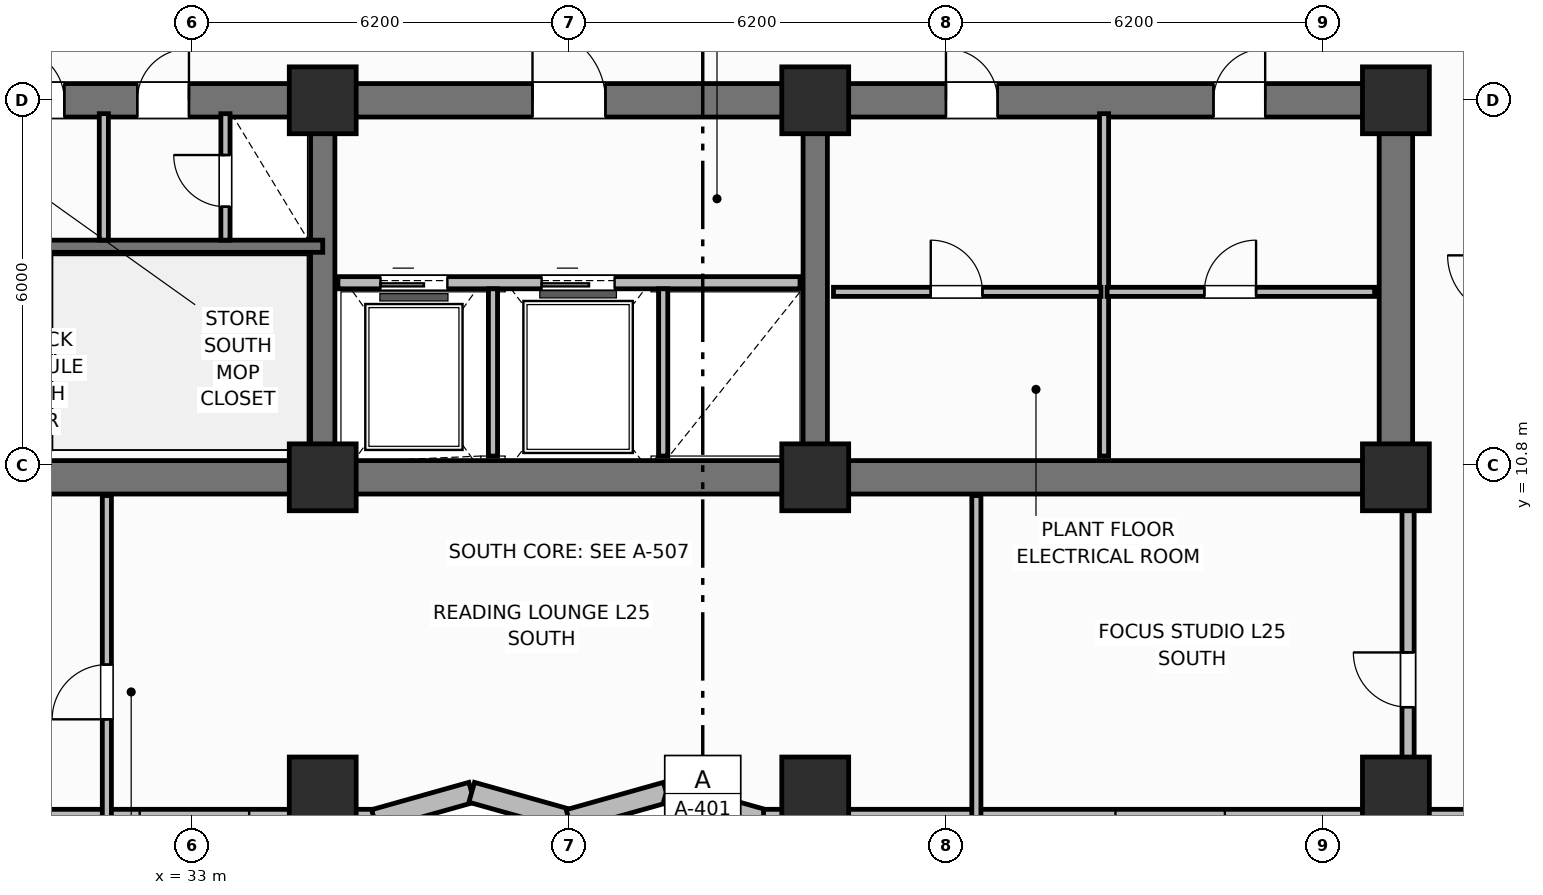
"""IFC4 building model, lengths in metres.
Left out: names, types, materials, properties, quantities, classifications, styles, units other than length and angle.
Written with IfcOpenShell. Run it as: python <this file> out.ifc"""

import sys

from ifc_helpers import new_model, si_unit, direction, frame, frame_2d, origin, origin_2d, place, context, subcontext, project, spatial, rectangle, extrude, element, fill, save


model = new_model("IFC4")
c1 = context("Model", 3, precision=1e-05, world=origin(), true_north=direction((0.0, 1.0)))
c2 = subcontext(c1, "Body", "Model", "MODEL_VIEW")
j1 = project(units=[si_unit("LENGTHUNIT", "METRE"), si_unit("PLANEANGLEUNIT", "RADIAN")], contexts=[c1])
p1 = place(None, origin())
s1 = spatial("IfcSite", under=j1, at=p1, CompositionType="ELEMENT")
p2 = place(p1, origin())
s2 = spatial("IfcBuilding", under=s1, at=p2, CompositionType="ELEMENT")
p3 = place(p2, frame((0.0, 0.0, 103.1)))
s3 = spatial("IfcBuildingStorey", under=s2, at=p3, CompositionType="ELEMENT", Elevation=103.1)
p4 = place(p3, frame((52.8, 10.6, 0.0), z_axis=(0.0, 0.0, 1.0), x_axis=(-1.0, 0.0, 0.0)))
e1 = element("IfcWall", 1, at=p4, inside=s3, PredefinedType="SHEAR", context=c2, shape_type="SweptSolid", body=[
    extrude(rectangle(XDim=27.2, YDim=0.55, at=frame_2d((13.6, 0.0))), origin(), (0.0, 0.0, 1.0), 3.7),
])
p5 = place(p3, frame((52.8, 10.875, 0.0), z_axis=(0.0, 0.0, 1.0), x_axis=(0.0, 1.0, 0.0)))
e2 = element("IfcWall", 2, at=p5, inside=s3, PredefinedType="SHEAR", context=c2, shape_type="SweptSolid", body=[
    extrude(rectangle(XDim=5.65, YDim=0.55, at=frame_2d((2.825, 0.0))), origin(), (0.0, 0.0, 1.0), 3.7),
])
p6 = place(p3, frame((25.6, 16.8, 0.0), z_axis=(0.0, 0.0, 1.0), x_axis=(1.0, 0.0, 0.0)))
e3 = element("IfcWall", 3, at=p6, inside=s3, PredefinedType="SHEAR", context=c2, shape_type="SweptSolid", body=[
    extrude(rectangle(XDim=27.2, YDim=0.55, at=frame_2d((13.6, 0.0))), origin(), (0.0, 0.0, 1.0), 3.7),
])
p7 = place(p6, frame((1.7, 0.0, 0.0)))
e4 = element("IfcOpeningElement", 4, at=p7, cuts=e3, PredefinedType="OPENING", context=c2, shape_type="SweptSolid", body=[
    extrude(rectangle(XDim=1.1, YDim=2.15, at=frame_2d((0.55, 1.075))), frame((0.0, 0.285, 0.0), z_axis=(0.0, -1.0, 0.0), x_axis=(1.0, 0.0, 0.0)), (0.0, 0.0, 1.0), 0.57),
])
p8 = place(p6, frame((4.45, 0.0, 0.0)))
e5 = element("IfcOpeningElement", 5, at=p8, cuts=e3, PredefinedType="OPENING", context=c2, shape_type="SweptSolid", body=[
    extrude(rectangle(XDim=0.85, YDim=2.1, at=frame_2d((0.425, 1.05))), frame((0.0, 0.285, 0.0), z_axis=(0.0, -1.0, 0.0), x_axis=(1.0, 0.0, 0.0)), (0.0, 0.0, 1.0), 0.57),
])
p9 = place(p6, frame((6.5, 0.0, 0.0)))
e6 = element("IfcOpeningElement", 6, at=p9, cuts=e3, PredefinedType="OPENING", context=c2, shape_type="SweptSolid", body=[
    extrude(rectangle(XDim=0.85, YDim=2.1, at=frame_2d((0.425, 1.05))), frame((0.0, 0.285, 0.0), z_axis=(0.0, -1.0, 0.0), x_axis=(1.0, 0.0, 0.0)), (0.0, 0.0, 1.0), 0.57),
])
p10 = place(p6, frame((13.0, 0.0, 0.0)))
e7 = element("IfcOpeningElement", 7, at=p10, cuts=e3, PredefinedType="OPENING", context=c2, shape_type="SweptSolid", body=[
    extrude(rectangle(XDim=1.2, YDim=2.15, at=frame_2d((0.6, 1.075))), frame((0.0, 0.285, 0.0), z_axis=(0.0, -1.0, 0.0), x_axis=(1.0, 0.0, 0.0)), (0.0, 0.0, 1.0), 0.57),
])
p11 = place(p6, frame((19.8, 0.0, 0.0)))
e8 = element("IfcOpeningElement", 8, at=p11, cuts=e3, PredefinedType="OPENING", context=c2, shape_type="SweptSolid", body=[
    extrude(rectangle(XDim=0.85, YDim=2.1, at=frame_2d((0.425, 1.05))), frame((0.0, 0.285, 0.0), z_axis=(0.0, -1.0, 0.0), x_axis=(1.0, 0.0, 0.0)), (0.0, 0.0, 1.0), 0.57),
])
p12 = place(p6, frame((24.2, 0.0, 0.0)))
e9 = element("IfcOpeningElement", 9, at=p12, cuts=e3, PredefinedType="OPENING", context=c2, shape_type="SweptSolid", body=[
    extrude(rectangle(XDim=0.85, YDim=2.1, at=frame_2d((0.425, 1.05))), frame((0.0, 0.285, 0.0), z_axis=(0.0, -1.0, 0.0), x_axis=(1.0, 0.0, 0.0)), (0.0, 0.0, 1.0), 0.57),
])
for number, where, z_axis, x_axis in (
    (10, (35.15, 10.875, 0.0), (0.0, 0.0, 1.0), (0.0, 1.0, 0.0)),
    (11, (43.25, 10.875, 0.0), (0.0, 0.0, 1.0), (0.0, 1.0, 0.0)),
):
    element("IfcWall", number, at=place(p3, frame(where, z_axis=z_axis, x_axis=x_axis)), inside=s3, PredefinedType="SHEAR", context=c2, shape_type="SweptSolid", body=[
        extrude(rectangle(XDim=5.65, YDim=0.4, at=frame_2d((2.825, 0.0))), origin(), (0.0, 0.0, 1.0), 3.7),
    ])
for number, where, z_axis, x_axis in (
    (12, (35.15, 10.6, 0.0), (0.0, 0.0, 1.0), (1.0, 0.0, 0.0)),
    (13, (35.15, 16.8, 0.0), (0.0, 0.0, 1.0), (1.0, 0.0, 0.0)),
    (14, (43.25, 10.6, 0.0), (0.0, 0.0, 1.0), (1.0, 0.0, 0.0)),
    (15, (43.25, 16.8, 0.0), (0.0, 0.0, 1.0), (1.0, 0.0, 0.0)),
    (16, (52.8, 10.6, 0.0), (0.0, 0.0, 1.0), (1.0, 0.0, 0.0)),
    (17, (52.8, 16.8, 0.0), (0.0, 0.0, 1.0), (1.0, 0.0, 0.0)),
    (18, (35.15, 5.45, 0.0), (0.0, 0.0, 1.0), (1.0, 0.0, 0.0)),
    (19, (43.25, 5.45, 0.0), (0.0, 0.0, 1.0), (1.0, 0.0, 0.0)),
    (20, (52.8, 5.45, 0.0), (0.0, 0.0, 1.0), (1.0, 0.0, 0.0)),
):
    element("IfcColumn", number, at=place(p3, frame(where, z_axis=z_axis, x_axis=x_axis)), inside=s3, PredefinedType="COLUMN", context=c2, shape_type="SweptSolid", body=[
        extrude(rectangle(XDim=1.1, YDim=1.1, at=origin_2d()), origin(), (0.0, 0.0, 1.0), 3.7),
    ])
p13 = place(p3, frame((18.6, 4.97, 0.0), z_axis=(0.0, 0.0, 1.0), x_axis=(1.0, 0.0, 0.0)))
e21 = element("IfcWall", 21, at=p13, inside=s3, PredefinedType="SOLIDWALL", context=c2, shape_type="SweptSolid", body=[
    extrude(rectangle(XDim=17.4, YDim=0.34, at=frame_2d((8.7, 0.0))), origin(), (0.0, 0.0, 1.0), 2.7),
])
p14 = place(p13, frame((1.36, 0.0, 0.73)))
e22 = element("IfcOpeningElement", 22, at=p14, cuts=e21, PredefinedType="OPENING", context=c2, shape_type="SweptSolid", body=[
    extrude(rectangle(XDim=1.8, YDim=1.85, at=frame_2d((0.9, 0.925))), frame((0.0, 0.18, 0.0), z_axis=(0.0, -1.0, 0.0), x_axis=(1.0, 0.0, 0.0)), (0.0, 0.0, 1.0), 0.36),
])
p15 = place(p13, frame((8.5, 0.0, 0.73)))
e23 = element("IfcOpeningElement", 23, at=p15, cuts=e21, PredefinedType="OPENING", context=c2, shape_type="SweptSolid", body=[
    extrude(rectangle(XDim=1.8, YDim=1.85, at=frame_2d((0.9, 0.925))), frame((0.0, 0.18, 0.0), z_axis=(0.0, -1.0, 0.0), x_axis=(1.0, 0.0, 0.0)), (0.0, 0.0, 1.0), 0.36),
])
p16 = place(p13, frame((13.54, 0.0, 0.73)))
e24 = element("IfcOpeningElement", 24, at=p16, cuts=e21, PredefinedType="OPENING", context=c2, shape_type="SweptSolid", body=[
    extrude(rectangle(XDim=1.8, YDim=1.85, at=frame_2d((0.9, 0.925))), frame((0.0, 0.18, 0.0), z_axis=(0.0, -1.0, 0.0), x_axis=(1.0, 0.0, 0.0)), (0.0, 0.0, 1.0), 0.36),
])
p17 = place(p3, frame((36.0, 4.97, 0.0), z_axis=(0.0, 0.0, 1.0), x_axis=(0.962662902433, 0.270703040766, 0.0)))
e25 = element("IfcWall", 25, at=p17, inside=s3, PredefinedType="SOLIDWALL", context=c2, shape_type="SweptSolid", body=[
    extrude(rectangle(XDim=1.662, YDim=0.34, at=frame_2d((0.831, 0.0))), origin(), (0.0, 0.0, 1.0), 2.7),
])
p18 = place(p3, frame((37.6, 5.42, 0.0), z_axis=(0.0, 0.0, 1.0), x_axis=(0.962652136636, -0.270741322725, 0.0)))
e26 = element("IfcWall", 26, at=p18, inside=s3, PredefinedType="SOLIDWALL", context=c2, shape_type="SweptSolid", body=[
    extrude(rectangle(XDim=1.662, YDim=0.34, at=frame_2d((0.831, 0.0))), origin(), (0.0, 0.0, 1.0), 2.7),
])
p19 = place(p3, frame((39.2, 4.97, 0.0), z_axis=(0.0, 0.0, 1.0), x_axis=(0.962662902433, 0.270703040766, 0.0)))
e27 = element("IfcWall", 27, at=p19, inside=s3, PredefinedType="SOLIDWALL", context=c2, shape_type="SweptSolid", body=[
    extrude(rectangle(XDim=1.662, YDim=0.34, at=frame_2d((0.831, 0.0))), origin(), (0.0, 0.0, 1.0), 2.7),
])
p20 = place(p3, frame((40.8, 5.42, 0.0), z_axis=(0.0, 0.0, 1.0), x_axis=(0.962652136636, -0.270741322725, 0.0)))
e28 = element("IfcWall", 28, at=p20, inside=s3, PredefinedType="SOLIDWALL", context=c2, shape_type="SweptSolid", body=[
    extrude(rectangle(XDim=1.662, YDim=0.34, at=frame_2d((0.831, 0.0))), origin(), (0.0, 0.0, 1.0), 2.7),
])
p21 = place(p3, frame((42.4, 4.97, 0.0), z_axis=(0.0, 0.0, 1.0), x_axis=(1.0, 0.0, 0.0)))
e29 = element("IfcWall", 29, at=p21, inside=s3, PredefinedType="SOLIDWALL", context=c2, shape_type="SweptSolid", body=[
    extrude(rectangle(XDim=17.4, YDim=0.34, at=frame_2d((8.7, 0.0))), origin(), (0.0, 0.0, 1.0), 2.7),
])
p22 = place(p21, frame((5.788, 0.0, 0.73)))
e30 = element("IfcOpeningElement", 30, at=p22, cuts=e29, PredefinedType="OPENING", context=c2, shape_type="SweptSolid", body=[
    extrude(rectangle(XDim=1.8, YDim=1.85, at=frame_2d((0.9, 0.925))), frame((0.0, 0.18, 0.0), z_axis=(0.0, -1.0, 0.0), x_axis=(1.0, 0.0, 0.0)), (0.0, 0.0, 1.0), 0.36),
])
p23 = place(p21, frame((13.837, 0.0, 0.73)))
e31 = element("IfcOpeningElement", 31, at=p23, cuts=e29, PredefinedType="OPENING", context=c2, shape_type="SweptSolid", body=[
    extrude(rectangle(XDim=1.8, YDim=1.85, at=frame_2d((0.9, 0.925))), frame((0.0, 0.18, 0.0), z_axis=(0.0, -1.0, 0.0), x_axis=(1.0, 0.0, 0.0)), (0.0, 0.0, 1.0), 0.36),
])
p24 = place(p3, frame((25.6, 14.4, 0.0), z_axis=(0.0, 0.0, 1.0), x_axis=(1.0, 0.0, 0.0)))
e32 = element("IfcWall", 32, at=p24, inside=s3, PredefinedType="SHEAR", context=c2, shape_type="SweptSolid", body=[
    extrude(rectangle(XDim=9.55, YDim=0.2, at=frame_2d((4.775, 0.0))), origin(), (0.0, 0.0, 1.0), 3.7),
])
p25 = place(p24, frame((1.05, 0.0, 0.0)))
e33 = element("IfcOpeningElement", 33, at=p25, cuts=e32, PredefinedType="OPENING", context=c2, shape_type="SweptSolid", body=[
    extrude(rectangle(XDim=1.1, YDim=2.15, at=frame_2d((0.55, 1.075))), frame((0.0, 0.11, 0.0), z_axis=(0.0, -1.0, 0.0), x_axis=(1.0, 0.0, 0.0)), (0.0, 0.0, 1.0), 0.22),
])
p26 = place(p3, frame((31.55, 14.5, 0.0), z_axis=(0.0, 0.0, 1.0), x_axis=(0.0, 1.0, 0.0)))
e34 = element("IfcWall", 34, at=p26, inside=s3, PredefinedType="PARTITIONING", context=c2, shape_type="SweptSolid", body=[
    extrude(rectangle(XDim=2.08, YDim=0.15, at=frame_2d((1.04, 0.0))), origin(), (0.0, 0.0, 1.0), 2.53),
])
p27 = place(p3, frame((33.55, 14.5, 0.0), z_axis=(0.0, 0.0, 1.0), x_axis=(0.0, 1.0, 0.0)))
e35 = element("IfcWall", 35, at=p27, inside=s3, PredefinedType="PARTITIONING", context=c2, shape_type="SweptSolid", body=[
    extrude(rectangle(XDim=2.08, YDim=0.15, at=frame_2d((1.04, 0.0))), origin(), (0.0, 0.0, 1.0), 2.53),
])
p28 = place(p27, frame((0.55, 0.0, 0.0)))
e36 = element("IfcOpeningElement", 36, at=p28, cuts=e35, PredefinedType="OPENING", context=c2, shape_type="SweptSolid", body=[
    extrude(rectangle(XDim=0.85, YDim=2.05, at=frame_2d((0.425, 1.025))), frame((0.0, 0.085, 0.0), z_axis=(0.0, -1.0, 0.0), x_axis=(1.0, 0.0, 0.0)), (0.0, 0.0, 1.0), 0.17),
])
p29 = place(p3, frame((35.4, 13.8, 0.0), z_axis=(0.0, 0.0, 1.0), x_axis=(1.0, 0.0, 0.0)))
e37 = element("IfcWall", 37, at=p29, inside=s3, PredefinedType="PARTITIONING", context=c2, shape_type="SweptSolid", body=[
    extrude(rectangle(XDim=7.6, YDim=0.2, at=frame_2d((3.8, 0.0))), origin(), (0.0, 0.0, 1.0), 2.3),
])
p30 = place(p29, frame((0.7, 0.0, 0.0)))
e38 = element("IfcOpeningElement", 38, at=p30, cuts=e37, PredefinedType="OPENING", context=c2, shape_type="SweptSolid", body=[
    extrude(rectangle(XDim=1.1, YDim=2.15, at=frame_2d((0.55, 1.075))), frame((0.0, 0.11, 0.0), z_axis=(0.0, -1.0, 0.0), x_axis=(1.0, 0.0, 0.0)), (0.0, 0.0, 1.0), 0.22),
])
p31 = place(p29, frame((3.35, 0.0, 0.0)))
e39 = element("IfcOpeningElement", 39, at=p31, cuts=e37, PredefinedType="OPENING", context=c2, shape_type="SweptSolid", body=[
    extrude(rectangle(XDim=1.2, YDim=2.15, at=frame_2d((0.6, 1.075))), frame((0.0, 0.11, 0.0), z_axis=(0.0, -1.0, 0.0), x_axis=(1.0, 0.0, 0.0)), (0.0, 0.0, 1.0), 0.22),
])
for number, where, z_axis, x_axis in (
    (40, (37.95, 10.95, 0.0), (0.0, 0.0, 1.0), (0.0, 1.0, 0.0)),
    (41, (40.75, 10.95, 0.0), (0.0, 0.0, 1.0), (0.0, 1.0, 0.0)),
):
    element("IfcWall", number, at=place(p3, frame(where, z_axis=z_axis, x_axis=x_axis)), inside=s3, PredefinedType="PARTITIONING", context=c2, shape_type="SweptSolid", body=[
        extrude(rectangle(XDim=2.75, YDim=0.15, at=frame_2d((1.375, 0.0))), origin(), (0.0, 0.0, 1.0), 2.53),
    ])
p32 = place(p3, frame((48.0, 10.95, 0.0), z_axis=(0.0, 0.0, 1.0), x_axis=(0.0, 1.0, 0.0)))
e42 = element("IfcWall", 42, at=p32, inside=s3, PredefinedType="PARTITIONING", context=c2, shape_type="SweptSolid", body=[
    extrude(rectangle(XDim=5.63, YDim=0.15, at=frame_2d((2.815, 0.0))), origin(), (0.0, 0.0, 1.0), 2.53),
])
p33 = place(p3, frame((43.55, 13.65, 0.0), z_axis=(0.0, 0.0, 1.0), x_axis=(1.0, 0.0, 0.0)))
e43 = element("IfcWall", 43, at=p33, inside=s3, PredefinedType="PARTITIONING", context=c2, shape_type="SweptSolid", body=[
    extrude(rectangle(XDim=4.4, YDim=0.15, at=frame_2d((2.2, 0.0))), origin(), (0.0, 0.0, 1.0), 2.53),
])
p34 = place(p33, frame((1.6, 0.0, 0.0)))
e44 = element("IfcOpeningElement", 44, at=p34, cuts=e43, PredefinedType="OPENING", context=c2, shape_type="SweptSolid", body=[
    extrude(rectangle(XDim=0.85, YDim=2.1, at=frame_2d((0.425, 1.05))), frame((0.0, 0.085, 0.0), z_axis=(0.0, -1.0, 0.0), x_axis=(1.0, 0.0, 0.0)), (0.0, 0.0, 1.0), 0.17),
])
p35 = place(p3, frame((48.05, 13.65, 0.0), z_axis=(0.0, 0.0, 1.0), x_axis=(1.0, 0.0, 0.0)))
e45 = element("IfcWall", 45, at=p35, inside=s3, PredefinedType="PARTITIONING", context=c2, shape_type="SweptSolid", body=[
    extrude(rectangle(XDim=4.4, YDim=0.15, at=frame_2d((2.2, 0.0))), origin(), (0.0, 0.0, 1.0), 2.53),
])
p36 = place(p35, frame((1.6, 0.0, 0.0)))
e46 = element("IfcOpeningElement", 46, at=p36, cuts=e45, PredefinedType="OPENING", context=c2, shape_type="SweptSolid", body=[
    extrude(rectangle(XDim=0.85, YDim=2.1, at=frame_2d((0.425, 1.05))), frame((0.0, 0.085, 0.0), z_axis=(0.0, -1.0, 0.0), x_axis=(1.0, 0.0, 0.0)), (0.0, 0.0, 1.0), 0.17),
])
p37 = place(p3, frame((31.6, 4.97, 0.0), z_axis=(0.0, 0.0, 1.0), x_axis=(0.0, 1.0, 0.0)))
e47 = element("IfcWall", 47, at=p37, inside=s3, PredefinedType="PARTITIONING", context=c2, shape_type="SweptSolid", body=[
    extrude(rectangle(XDim=5.33, YDim=0.15, at=frame_2d((2.665, 0.0))), origin(), (0.0, 0.0, 1.0), 2.53),
])
p38 = place(p37, frame((1.65, 0.0, 0.0)))
e48 = element("IfcOpeningElement", 48, at=p38, cuts=e47, PredefinedType="OPENING", context=c2, shape_type="SweptSolid", body=[
    extrude(rectangle(XDim=0.9, YDim=2.1, at=frame_2d((0.45, 1.05))), frame((0.0, 0.085, 0.0), z_axis=(0.0, -1.0, 0.0), x_axis=(1.0, 0.0, 0.0)), (0.0, 0.0, 1.0), 0.17),
])
p39 = place(p3, frame((45.9, 4.97, 0.0), z_axis=(0.0, 0.0, 1.0), x_axis=(0.0, 1.0, 0.0)))
e49 = element("IfcWall", 49, at=p39, inside=s3, PredefinedType="PARTITIONING", context=c2, shape_type="SweptSolid", body=[
    extrude(rectangle(XDim=5.33, YDim=0.15, at=frame_2d((2.665, 0.0))), origin(), (0.0, 0.0, 1.0), 2.53),
])
p40 = place(p3, frame((53.0, 5.97, 0.0), z_axis=(0.0, 0.0, 1.0), x_axis=(0.0, 1.0, 0.0)))
e50 = element("IfcWall", 50, at=p40, inside=s3, PredefinedType="PARTITIONING", context=c2, shape_type="SweptSolid", body=[
    extrude(rectangle(XDim=4.33, YDim=0.2, at=frame_2d((2.165, 0.0))), origin(), (0.0, 0.0, 1.0), 2.53),
])
p41 = place(p40, frame((0.85, 0.0, 0.0)))
e51 = element("IfcOpeningElement", 51, at=p41, cuts=e50, PredefinedType="OPENING", context=c2, shape_type="SweptSolid", body=[
    extrude(rectangle(XDim=0.9, YDim=2.1, at=frame_2d((0.45, 1.05))), frame((0.0, 0.11, 0.0), z_axis=(0.0, -1.0, 0.0), x_axis=(1.0, 0.0, 0.0)), (0.0, 0.0, 1.0), 0.22),
])
p42 = place(p28, origin())
e52 = element("IfcDoor", 52, at=p42, inside=s3, OperationType="SINGLE_SWING_RIGHT", PredefinedType="TRAPDOOR", context=c2, shape_type="SweptSolid", body=[
    extrude(rectangle(XDim=0.85, YDim=2.05, at=frame_2d((0.425, 1.025))), frame((0.0, 0.025, 0.0), z_axis=(0.0, -1.0, 0.0), x_axis=(1.0, 0.0, 0.0)), (0.0, 0.0, 1.0), 0.05),
])
fill(e36, e52)
p43 = place(p30, origin())
e53 = element("IfcDoor", 53, at=p43, inside=s3, OperationType="SLIDING_TO_LEFT", PredefinedType="DOOR", context=c2, shape_type="SweptSolid", body=[
    extrude(rectangle(XDim=1.1, YDim=2.15, at=frame_2d((0.55, 1.075))), frame((0.0, 0.025, 0.0), z_axis=(0.0, -1.0, 0.0), x_axis=(1.0, 0.0, 0.0)), (0.0, 0.0, 1.0), 0.05),
])
fill(e38, e53)
p44 = place(p31, origin())
e54 = element("IfcDoor", 54, at=p44, inside=s3, OperationType="SLIDING_TO_LEFT", PredefinedType="DOOR", context=c2, shape_type="SweptSolid", body=[
    extrude(rectangle(XDim=1.2, YDim=2.15, at=frame_2d((0.6, 1.075))), frame((0.0, 0.025, 0.0), z_axis=(0.0, -1.0, 0.0), x_axis=(1.0, 0.0, 0.0)), (0.0, 0.0, 1.0), 0.05),
])
fill(e39, e54)
p45 = place(p34, origin())
e55 = element("IfcDoor", 55, at=p45, inside=s3, OperationType="SINGLE_SWING_LEFT", PredefinedType="DOOR", context=c2, shape_type="SweptSolid", body=[
    extrude(rectangle(XDim=0.85, YDim=2.1, at=frame_2d((0.425, 1.05))), frame((0.0, 0.025, 0.0), z_axis=(0.0, -1.0, 0.0), x_axis=(1.0, 0.0, 0.0)), (0.0, 0.0, 1.0), 0.05),
])
fill(e44, e55)
p46 = place(p36, origin())
e56 = element("IfcDoor", 56, at=p46, inside=s3, OperationType="SINGLE_SWING_RIGHT", PredefinedType="DOOR", context=c2, shape_type="SweptSolid", body=[
    extrude(rectangle(XDim=0.85, YDim=2.1, at=frame_2d((0.425, 1.05))), frame((0.0, 0.025, 0.0), z_axis=(0.0, -1.0, 0.0), x_axis=(1.0, 0.0, 0.0)), (0.0, 0.0, 1.0), 0.05),
])
fill(e46, e56)
p47 = place(p38, origin())
e57 = element("IfcDoor", 57, at=p47, inside=s3, OperationType="SINGLE_SWING_LEFT", PredefinedType="DOOR", context=c2, shape_type="SweptSolid", body=[
    extrude(rectangle(XDim=0.9, YDim=2.1, at=frame_2d((0.45, 1.05))), frame((0.0, 0.025, 0.0), z_axis=(0.0, -1.0, 0.0), x_axis=(1.0, 0.0, 0.0)), (0.0, 0.0, 1.0), 0.05),
])
fill(e48, e57)
p48 = place(p41, origin())
e58 = element("IfcDoor", 58, at=p48, inside=s3, OperationType="SINGLE_SWING_RIGHT", PredefinedType="DOOR", context=c2, shape_type="SweptSolid", body=[
    extrude(rectangle(XDim=0.9, YDim=2.1, at=frame_2d((0.45, 1.05))), frame((0.0, 0.025, 0.0), z_axis=(0.0, -1.0, 0.0), x_axis=(1.0, 0.0, 0.0)), (0.0, 0.0, 1.0), 0.05),
])
fill(e51, e58)
p49 = place(p8, origin())
e59 = element("IfcDoor", 59, at=p49, inside=s3, OperationType="SINGLE_SWING_LEFT", PredefinedType="DOOR", context=c2, shape_type="SweptSolid", body=[
    extrude(rectangle(XDim=0.85, YDim=2.1, at=frame_2d((0.425, 1.05))), frame((0.0, 0.025, 0.0), z_axis=(0.0, -1.0, 0.0), x_axis=(1.0, 0.0, 0.0)), (0.0, 0.0, 1.0), 0.05),
])
fill(e5, e59)
p50 = place(p9, origin())
e60 = element("IfcDoor", 60, at=p50, inside=s3, OperationType="SINGLE_SWING_RIGHT", PredefinedType="DOOR", context=c2, shape_type="SweptSolid", body=[
    extrude(rectangle(XDim=0.85, YDim=2.1, at=frame_2d((0.425, 1.05))), frame((0.0, 0.025, 0.0), z_axis=(0.0, -1.0, 0.0), x_axis=(1.0, 0.0, 0.0)), (0.0, 0.0, 1.0), 0.05),
])
fill(e6, e60)
p51 = place(p10, origin())
e61 = element("IfcDoor", 61, at=p51, inside=s3, OperationType="SINGLE_SWING_LEFT", PredefinedType="DOOR", context=c2, shape_type="SweptSolid", body=[
    extrude(rectangle(XDim=1.2, YDim=2.15, at=frame_2d((0.6, 1.075))), frame((0.0, 0.025, 0.0), z_axis=(0.0, -1.0, 0.0), x_axis=(1.0, 0.0, 0.0)), (0.0, 0.0, 1.0), 0.05),
])
fill(e7, e61)
p52 = place(p11, origin())
e62 = element("IfcDoor", 62, at=p52, inside=s3, OperationType="SINGLE_SWING_LEFT", PredefinedType="DOOR", context=c2, shape_type="SweptSolid", body=[
    extrude(rectangle(XDim=0.85, YDim=2.1, at=frame_2d((0.425, 1.05))), frame((0.0, 0.025, 0.0), z_axis=(0.0, -1.0, 0.0), x_axis=(1.0, 0.0, 0.0)), (0.0, 0.0, 1.0), 0.05),
])
fill(e8, e62)
p53 = place(p12, origin())
e63 = element("IfcDoor", 63, at=p53, inside=s3, OperationType="SINGLE_SWING_RIGHT", PredefinedType="DOOR", context=c2, shape_type="SweptSolid", body=[
    extrude(rectangle(XDim=0.85, YDim=2.1, at=frame_2d((0.425, 1.05))), frame((0.0, 0.025, 0.0), z_axis=(0.0, -1.0, 0.0), x_axis=(1.0, 0.0, 0.0)), (0.0, 0.0, 1.0), 0.05),
])
fill(e9, e63)
save(model, sys.argv[1])
